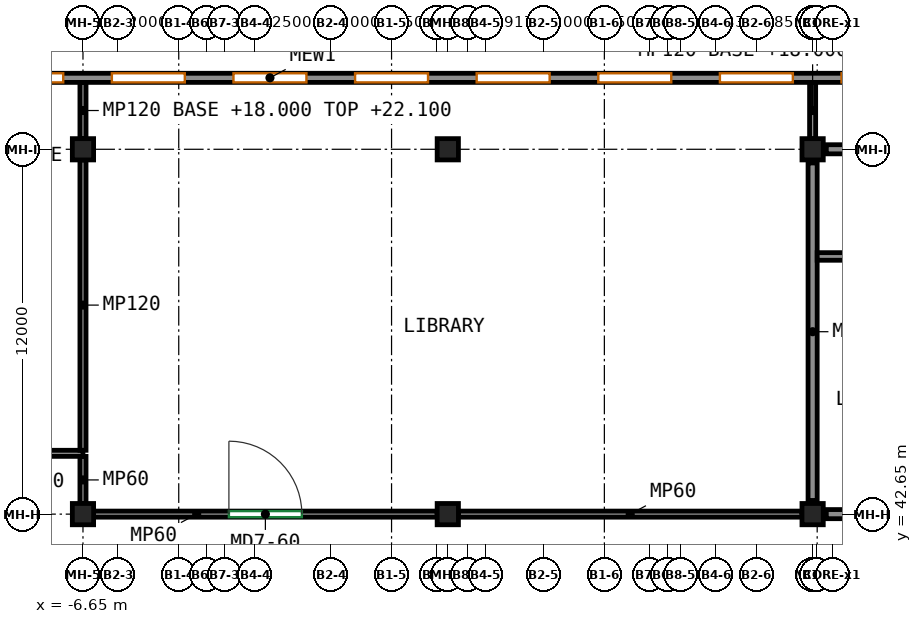
"""IFC4 building model, lengths in metres.
Left out: names, types, materials, properties, quantities, classifications, styles, units other than length and angle.
Written with IfcOpenShell. Run it as: python <this file> out.ifc"""

import sys

from ifc_helpers import new_model, si_unit, direction, frame, frame_2d, origin, origin_2d, place, context, subcontext, project, spatial, rectangle, extrude, source, transform, mapped, element, fill, save


model = new_model("IFC4")
c1 = context("Model", 3, precision=1e-05, world=origin(), true_north=direction((0.0, 1.0)))
c2 = subcontext(c1, "Body", "Model", "MODEL_VIEW")
j1 = project(units=[si_unit("LENGTHUNIT", "METRE"), si_unit("PLANEANGLEUNIT", "RADIAN")], contexts=[c1])
p1 = place(None, origin())
s1 = spatial("IfcSite", under=j1, at=p1, CompositionType="ELEMENT")
p2 = place(p1, origin())
s2 = spatial("IfcBuilding", under=s1, at=p2, CompositionType="ELEMENT")
p3 = place(p2, frame((0.0, 0.0, 18.0)))
s3 = spatial("IfcBuildingStorey", under=s2, at=p3, CompositionType="ELEMENT", Elevation=18.0)
m1 = source(origin(), c2, "Body", "SweptSolid", [
    extrude(rectangle(XDim=0.7, YDim=0.7, at=origin_2d()), origin(), (0.0, 0.0, 1.0), 4.1),
])
for number, where, z_axis, x_axis in (
    (1, (-6.65, 42.65, 0.0), (0.0, 0.0, 1.0), (1.0, 0.0, 0.0)),
    (2, (-6.65, 54.65, 0.0), (0.0, 0.0, 1.0), (1.0, 0.0, 0.0)),
    (3, (5.35, 42.65, 0.0), (0.0, 0.0, 1.0), (1.0, 0.0, 0.0)),
    (4, (5.35, 54.65, 0.0), (0.0, 0.0, 1.0), (1.0, 0.0, 0.0)),
    (5, (17.35, 42.65, 0.0), (0.0, 0.0, 1.0), (1.0, 0.0, 0.0)),
    (6, (17.35, 54.65, 0.0), (0.0, 0.0, 1.0), (1.0, 0.0, 0.0)),
):
    element("IfcColumn", number, at=place(p3, frame(where, z_axis=z_axis, x_axis=x_axis)), inside=s3, PredefinedType="COLUMN", context=c2, shape_type="MappedRepresentation", body=[
        mapped(m1, transform((0.0, 0.0, 0.0))),
    ])
m2 = source(origin(), c2, "Body", "SweptSolid", [
    extrude(rectangle(XDim=12.4, YDim=0.3, at=frame_2d((6.2, 0.0))), origin(), (0.0, 0.0, 1.0), 3.3),
])
p4 = place(p3, frame((30.2, 54.65, 0.0), z_axis=(0.0, 0.0, 1.0), x_axis=(-1.0, 0.0, 0.0)))
e7 = element("IfcWall", 7, at=p4, inside=s3, PredefinedType="SHEAR", context=c2, shape_type="MappedRepresentation", body=[
    mapped(m2, transform((0.0, 0.0, 0.0))),
])
p5 = place(p4, frame((5.7, 0.0, 0.0)))
e8 = element("IfcOpeningElement", 8, at=p5, cuts=e7, PredefinedType="OPENING", context=c2, shape_type="SweptSolid", body=[
    extrude(rectangle(XDim=1.0, YDim=2.1, at=frame_2d((0.5, 1.05))), frame((0.0, 0.16, 0.0), z_axis=(0.0, -1.0, 0.0), x_axis=(1.0, 0.0, 0.0)), (0.0, 0.0, 1.0), 0.32),
])
p6 = place(p3, frame((30.2, 42.65, 0.0), z_axis=(0.0, 0.0, 1.0), x_axis=(-1.0, 0.0, 0.0)))
e9 = element("IfcWall", 9, at=p6, inside=s3, PredefinedType="SHEAR", context=c2, shape_type="MappedRepresentation", body=[
    mapped(m2, transform((0.0, 0.0, 0.0))),
])
p7 = place(p6, frame((5.2, 0.0, 0.0)))
e10 = element("IfcOpeningElement", 10, at=p7, cuts=e9, PredefinedType="OPENING", context=c2, shape_type="SweptSolid", body=[
    extrude(rectangle(XDim=2.0, YDim=2.4, at=frame_2d((1.0, 1.2))), frame((0.0, 0.16, 0.0), z_axis=(0.0, -1.0, 0.0), x_axis=(1.0, 0.0, 0.0)), (0.0, 0.0, 1.0), 0.32),
])
m3 = source(origin(), c2, "Body", "SweptSolid", [
    extrude(rectangle(XDim=11.1, YDim=0.3, at=frame_2d((5.55, 0.0))), origin(), (0.0, 0.0, 1.0), 3.3),
])
p8 = place(p3, frame((17.35, 54.2, 0.0), z_axis=(0.0, 0.0, 1.0), x_axis=(0.0, -1.0, 0.0)))
e11 = element("IfcWall", 11, at=p8, inside=s3, PredefinedType="SHEAR", context=c2, shape_type="MappedRepresentation", body=[
    mapped(m3, transform((0.0, 0.0, 0.0))),
])
m4 = source(origin(), c2, "Body", "SweptSolid", [
    extrude(rectangle(XDim=4.15, YDim=0.25, at=frame_2d((2.075, 0.0))), origin(), (0.0, 0.0, 1.0), 4.1),
])
p9 = place(p3, frame((21.65, 51.125, 0.0), z_axis=(0.0, 0.0, 1.0), x_axis=(-1.0, 0.0, 0.0)))
e12 = element("IfcWall", 12, at=p9, inside=s3, PredefinedType="SHEAR", context=c2, shape_type="MappedRepresentation", body=[
    mapped(m4, transform((0.0, 0.0, 0.0))),
])
p10 = place(p9, frame((1.4, 0.0, 0.0)))
e13 = element("IfcOpeningElement", 13, at=p10, cuts=e12, PredefinedType="OPENING", context=c2, shape_type="SweptSolid", body=[
    extrude(rectangle(XDim=1.1, YDim=2.1, at=frame_2d((0.55, 1.05))), frame((0.0, 0.135, 0.0), z_axis=(0.0, -1.0, 0.0), x_axis=(1.0, 0.0, 0.0)), (0.0, 0.0, 1.0), 0.27),
])
m5 = source(origin(), c2, "Body", "SweptSolid", [
    extrude(rectangle(XDim=112.7, YDim=0.3, at=frame_2d((56.35, 0.0))), origin(), (0.0, 0.0, 1.0), 4.1),
])
p11 = place(p3, frame((-56.85, 57.0, 0.0), z_axis=(0.0, 0.0, 1.0), x_axis=(1.0, 0.0, 0.0)))
e14 = element("IfcWall", 14, at=p11, inside=s3, PredefinedType="SOLIDWALL", context=c2, shape_type="MappedRepresentation", body=[
    mapped(m5, transform((0.0, 0.0, 0.0))),
])
p12 = place(p11, frame((3.15, 0.0, 0.9)))
e15 = element("IfcOpeningElement", 15, at=p12, cuts=e14, PredefinedType="OPENING", context=c2, shape_type="SweptSolid", body=[
    extrude(rectangle(XDim=2.4, YDim=1.8, at=frame_2d((1.2, 0.9))), frame((0.0, 0.16, 0.0), z_axis=(0.0, -1.0, 0.0), x_axis=(1.0, 0.0, 0.0)), (0.0, 0.0, 1.0), 0.32),
])
p13 = place(p11, frame((7.15, 0.0, 0.9)))
e16 = element("IfcOpeningElement", 16, at=p13, cuts=e14, PredefinedType="OPENING", context=c2, shape_type="SweptSolid", body=[
    extrude(rectangle(XDim=2.4, YDim=1.8, at=frame_2d((1.2, 0.9))), frame((0.0, 0.16, 0.0), z_axis=(0.0, -1.0, 0.0), x_axis=(1.0, 0.0, 0.0)), (0.0, 0.0, 1.0), 0.32),
])
p14 = place(p11, frame((11.15, 0.0, 0.9)))
e17 = element("IfcOpeningElement", 17, at=p14, cuts=e14, PredefinedType="OPENING", context=c2, shape_type="SweptSolid", body=[
    extrude(rectangle(XDim=2.4, YDim=1.8, at=frame_2d((1.2, 0.9))), frame((0.0, 0.16, 0.0), z_axis=(0.0, -1.0, 0.0), x_axis=(1.0, 0.0, 0.0)), (0.0, 0.0, 1.0), 0.32),
])
p15 = place(p11, frame((15.15, 0.0, 0.9)))
e18 = element("IfcOpeningElement", 18, at=p15, cuts=e14, PredefinedType="OPENING", context=c2, shape_type="SweptSolid", body=[
    extrude(rectangle(XDim=2.4, YDim=1.8, at=frame_2d((1.2, 0.9))), frame((0.0, 0.16, 0.0), z_axis=(0.0, -1.0, 0.0), x_axis=(1.0, 0.0, 0.0)), (0.0, 0.0, 1.0), 0.32),
])
p16 = place(p11, frame((19.15, 0.0, 0.9)))
e19 = element("IfcOpeningElement", 19, at=p16, cuts=e14, PredefinedType="OPENING", context=c2, shape_type="SweptSolid", body=[
    extrude(rectangle(XDim=2.4, YDim=1.8, at=frame_2d((1.2, 0.9))), frame((0.0, 0.16, 0.0), z_axis=(0.0, -1.0, 0.0), x_axis=(1.0, 0.0, 0.0)), (0.0, 0.0, 1.0), 0.32),
])
p17 = place(p11, frame((23.15, 0.0, 0.9)))
e20 = element("IfcOpeningElement", 20, at=p17, cuts=e14, PredefinedType="OPENING", context=c2, shape_type="SweptSolid", body=[
    extrude(rectangle(XDim=2.4, YDim=1.8, at=frame_2d((1.2, 0.9))), frame((0.0, 0.16, 0.0), z_axis=(0.0, -1.0, 0.0), x_axis=(1.0, 0.0, 0.0)), (0.0, 0.0, 1.0), 0.32),
])
p18 = place(p11, frame((27.15, 0.0, 0.9)))
e21 = element("IfcOpeningElement", 21, at=p18, cuts=e14, PredefinedType="OPENING", context=c2, shape_type="SweptSolid", body=[
    extrude(rectangle(XDim=2.4, YDim=1.8, at=frame_2d((1.2, 0.9))), frame((0.0, 0.16, 0.0), z_axis=(0.0, -1.0, 0.0), x_axis=(1.0, 0.0, 0.0)), (0.0, 0.0, 1.0), 0.32),
])
p19 = place(p11, frame((31.15, 0.0, 0.9)))
e22 = element("IfcOpeningElement", 22, at=p19, cuts=e14, PredefinedType="OPENING", context=c2, shape_type="SweptSolid", body=[
    extrude(rectangle(XDim=2.4, YDim=1.8, at=frame_2d((1.2, 0.9))), frame((0.0, 0.16, 0.0), z_axis=(0.0, -1.0, 0.0), x_axis=(1.0, 0.0, 0.0)), (0.0, 0.0, 1.0), 0.32),
])
p20 = place(p11, frame((35.15, 0.0, 0.9)))
e23 = element("IfcOpeningElement", 23, at=p20, cuts=e14, PredefinedType="OPENING", context=c2, shape_type="SweptSolid", body=[
    extrude(rectangle(XDim=2.4, YDim=1.8, at=frame_2d((1.2, 0.9))), frame((0.0, 0.16, 0.0), z_axis=(0.0, -1.0, 0.0), x_axis=(1.0, 0.0, 0.0)), (0.0, 0.0, 1.0), 0.32),
])
p21 = place(p11, frame((43.15, 0.0, 0.9)))
e24 = element("IfcOpeningElement", 24, at=p21, cuts=e14, PredefinedType="OPENING", context=c2, shape_type="SweptSolid", body=[
    extrude(rectangle(XDim=2.4, YDim=1.8, at=frame_2d((1.2, 0.9))), frame((0.0, 0.16, 0.0), z_axis=(0.0, -1.0, 0.0), x_axis=(1.0, 0.0, 0.0)), (0.0, 0.0, 1.0), 0.32),
])
p22 = place(p11, frame((47.15, 0.0, 0.9)))
e25 = element("IfcOpeningElement", 25, at=p22, cuts=e14, PredefinedType="OPENING", context=c2, shape_type="SweptSolid", body=[
    extrude(rectangle(XDim=2.4, YDim=1.8, at=frame_2d((1.2, 0.9))), frame((0.0, 0.16, 0.0), z_axis=(0.0, -1.0, 0.0), x_axis=(1.0, 0.0, 0.0)), (0.0, 0.0, 1.0), 0.32),
])
p23 = place(p11, frame((51.15, 0.0, 0.9)))
e26 = element("IfcOpeningElement", 26, at=p23, cuts=e14, PredefinedType="OPENING", context=c2, shape_type="SweptSolid", body=[
    extrude(rectangle(XDim=2.4, YDim=1.8, at=frame_2d((1.2, 0.9))), frame((0.0, 0.16, 0.0), z_axis=(0.0, -1.0, 0.0), x_axis=(1.0, 0.0, 0.0)), (0.0, 0.0, 1.0), 0.32),
])
p24 = place(p11, frame((55.15, 0.0, 0.9)))
e27 = element("IfcOpeningElement", 27, at=p24, cuts=e14, PredefinedType="OPENING", context=c2, shape_type="SweptSolid", body=[
    extrude(rectangle(XDim=2.4, YDim=1.8, at=frame_2d((1.2, 0.9))), frame((0.0, 0.16, 0.0), z_axis=(0.0, -1.0, 0.0), x_axis=(1.0, 0.0, 0.0)), (0.0, 0.0, 1.0), 0.32),
])
p25 = place(p11, frame((59.15, 0.0, 0.9)))
e28 = element("IfcOpeningElement", 28, at=p25, cuts=e14, PredefinedType="OPENING", context=c2, shape_type="SweptSolid", body=[
    extrude(rectangle(XDim=2.4, YDim=1.8, at=frame_2d((1.2, 0.9))), frame((0.0, 0.16, 0.0), z_axis=(0.0, -1.0, 0.0), x_axis=(1.0, 0.0, 0.0)), (0.0, 0.0, 1.0), 0.32),
])
p26 = place(p11, frame((63.15, 0.0, 0.9)))
e29 = element("IfcOpeningElement", 29, at=p26, cuts=e14, PredefinedType="OPENING", context=c2, shape_type="SweptSolid", body=[
    extrude(rectangle(XDim=2.4, YDim=1.8, at=frame_2d((1.2, 0.9))), frame((0.0, 0.16, 0.0), z_axis=(0.0, -1.0, 0.0), x_axis=(1.0, 0.0, 0.0)), (0.0, 0.0, 1.0), 0.32),
])
p27 = place(p11, frame((67.15, 0.0, 0.9)))
e30 = element("IfcOpeningElement", 30, at=p27, cuts=e14, PredefinedType="OPENING", context=c2, shape_type="SweptSolid", body=[
    extrude(rectangle(XDim=2.4, YDim=1.8, at=frame_2d((1.2, 0.9))), frame((0.0, 0.16, 0.0), z_axis=(0.0, -1.0, 0.0), x_axis=(1.0, 0.0, 0.0)), (0.0, 0.0, 1.0), 0.32),
])
p28 = place(p11, frame((71.15, 0.0, 0.9)))
e31 = element("IfcOpeningElement", 31, at=p28, cuts=e14, PredefinedType="OPENING", context=c2, shape_type="SweptSolid", body=[
    extrude(rectangle(XDim=2.4, YDim=1.8, at=frame_2d((1.2, 0.9))), frame((0.0, 0.16, 0.0), z_axis=(0.0, -1.0, 0.0), x_axis=(1.0, 0.0, 0.0)), (0.0, 0.0, 1.0), 0.32),
])
p29 = place(p11, frame((75.15, 0.0, 0.9)))
e32 = element("IfcOpeningElement", 32, at=p29, cuts=e14, PredefinedType="OPENING", context=c2, shape_type="SweptSolid", body=[
    extrude(rectangle(XDim=2.4, YDim=1.8, at=frame_2d((1.2, 0.9))), frame((0.0, 0.16, 0.0), z_axis=(0.0, -1.0, 0.0), x_axis=(1.0, 0.0, 0.0)), (0.0, 0.0, 1.0), 0.32),
])
p30 = place(p11, frame((79.15, 0.0, 0.9)))
e33 = element("IfcOpeningElement", 33, at=p30, cuts=e14, PredefinedType="OPENING", context=c2, shape_type="SweptSolid", body=[
    extrude(rectangle(XDim=2.4, YDim=1.8, at=frame_2d((1.2, 0.9))), frame((0.0, 0.16, 0.0), z_axis=(0.0, -1.0, 0.0), x_axis=(1.0, 0.0, 0.0)), (0.0, 0.0, 1.0), 0.32),
])
p31 = place(p11, frame((83.15, 0.0, 0.9)))
e34 = element("IfcOpeningElement", 34, at=p31, cuts=e14, PredefinedType="OPENING", context=c2, shape_type="SweptSolid", body=[
    extrude(rectangle(XDim=2.4, YDim=1.8, at=frame_2d((1.2, 0.9))), frame((0.0, 0.16, 0.0), z_axis=(0.0, -1.0, 0.0), x_axis=(1.0, 0.0, 0.0)), (0.0, 0.0, 1.0), 0.32),
])
p32 = place(p11, frame((87.15, 0.0, 0.9)))
e35 = element("IfcOpeningElement", 35, at=p32, cuts=e14, PredefinedType="OPENING", context=c2, shape_type="SweptSolid", body=[
    extrude(rectangle(XDim=2.4, YDim=1.8, at=frame_2d((1.2, 0.9))), frame((0.0, 0.16, 0.0), z_axis=(0.0, -1.0, 0.0), x_axis=(1.0, 0.0, 0.0)), (0.0, 0.0, 1.0), 0.32),
])
p33 = place(p11, frame((91.15, 0.0, 0.9)))
e36 = element("IfcOpeningElement", 36, at=p33, cuts=e14, PredefinedType="OPENING", context=c2, shape_type="SweptSolid", body=[
    extrude(rectangle(XDim=2.4, YDim=1.8, at=frame_2d((1.2, 0.9))), frame((0.0, 0.16, 0.0), z_axis=(0.0, -1.0, 0.0), x_axis=(1.0, 0.0, 0.0)), (0.0, 0.0, 1.0), 0.32),
])
p34 = place(p11, frame((95.15, 0.0, 0.9)))
e37 = element("IfcOpeningElement", 37, at=p34, cuts=e14, PredefinedType="OPENING", context=c2, shape_type="SweptSolid", body=[
    extrude(rectangle(XDim=2.4, YDim=1.8, at=frame_2d((1.2, 0.9))), frame((0.0, 0.16, 0.0), z_axis=(0.0, -1.0, 0.0), x_axis=(1.0, 0.0, 0.0)), (0.0, 0.0, 1.0), 0.32),
])
p35 = place(p11, frame((103.15, 0.0, 0.9)))
e38 = element("IfcOpeningElement", 38, at=p35, cuts=e14, PredefinedType="OPENING", context=c2, shape_type="SweptSolid", body=[
    extrude(rectangle(XDim=2.4, YDim=1.8, at=frame_2d((1.2, 0.9))), frame((0.0, 0.16, 0.0), z_axis=(0.0, -1.0, 0.0), x_axis=(1.0, 0.0, 0.0)), (0.0, 0.0, 1.0), 0.32),
])
p36 = place(p11, frame((107.15, 0.0, 0.9)))
e39 = element("IfcOpeningElement", 39, at=p36, cuts=e14, PredefinedType="OPENING", context=c2, shape_type="SweptSolid", body=[
    extrude(rectangle(XDim=2.4, YDim=1.8, at=frame_2d((1.2, 0.9))), frame((0.0, 0.16, 0.0), z_axis=(0.0, -1.0, 0.0), x_axis=(1.0, 0.0, 0.0)), (0.0, 0.0, 1.0), 0.32),
])
m6 = source(origin(), c2, "Body", "SweptSolid", [
    extrude(rectangle(XDim=3.9, YDim=0.2, at=frame_2d((1.95, 0.0))), origin(), (0.0, 0.0, 1.0), 3.3),
])
p37 = place(p3, frame((-10.55, 44.65, 0.0), z_axis=(0.0, 0.0, 1.0), x_axis=(1.0, 0.0, 0.0)))
e40 = element("IfcWall", 40, at=p37, inside=s3, PredefinedType="PARTITIONING", context=c2, shape_type="MappedRepresentation", body=[
    mapped(m6, transform((0.0, 0.0, 0.0))),
])
p38 = place(p37, frame((1.35, 0.0, 0.0)))
e41 = element("IfcOpeningElement", 41, at=p38, cuts=e40, PredefinedType="OPENING", context=c2, shape_type="SweptSolid", body=[
    extrude(rectangle(XDim=1.2, YDim=2.1, at=frame_2d((0.6, 1.05))), frame((0.0, 0.11, 0.0), z_axis=(0.0, -1.0, 0.0), x_axis=(1.0, 0.0, 0.0)), (0.0, 0.0, 1.0), 0.22),
])
m7 = source(origin(), c2, "Body", "SweptSolid", [
    extrude(rectangle(XDim=1.55, YDim=0.2, at=frame_2d((0.775, 0.0))), origin(), (0.0, 0.0, 1.0), 3.3),
])
p39 = place(p3, frame((-6.65, 44.55, 0.0), z_axis=(0.0, 0.0, 1.0), x_axis=(0.0, -1.0, 0.0)))
e42 = element("IfcWall", 42, at=p39, inside=s3, PredefinedType="PARTITIONING", context=c2, shape_type="MappedRepresentation", body=[
    mapped(m7, transform((0.0, 0.0, 0.0))),
])
m8 = source(origin(), c2, "Body", "SweptSolid", [
    extrude(rectangle(XDim=9.55, YDim=0.2, at=frame_2d((4.775, 0.0))), origin(), (0.0, 0.0, 1.0), 3.3),
])
p40 = place(p3, frame((-6.65, 54.3, 0.0), z_axis=(0.0, 0.0, 1.0), x_axis=(0.0, -1.0, 0.0)))
e43 = element("IfcWall", 43, at=p40, inside=s3, PredefinedType="PARTITIONING", context=c2, shape_type="MappedRepresentation", body=[
    mapped(m8, transform((0.0, 0.0, 0.0))),
])
m9 = source(origin(), c2, "Body", "SweptSolid", [
    extrude(rectangle(XDim=1.85, YDim=0.2, at=frame_2d((0.925, 0.0))), origin(), (0.0, 0.0, 1.0), 4.1),
])
p41 = place(p3, frame((-6.65, 56.85, 0.0), z_axis=(0.0, 0.0, 1.0), x_axis=(0.0, -1.0, 0.0)))
e44 = element("IfcWall", 44, at=p41, inside=s3, PredefinedType="PARTITIONING", context=c2, shape_type="MappedRepresentation", body=[
    mapped(m9, transform((0.0, 0.0, 0.0))),
])
m10 = source(origin(), c2, "Body", "SweptSolid", [
    extrude(rectangle(XDim=11.3, YDim=0.2, at=frame_2d((5.65, 0.0))), origin(), (0.0, 0.0, 1.0), 3.3),
])
p42 = place(p3, frame((-6.3, 42.65, 0.0), z_axis=(0.0, 0.0, 1.0), x_axis=(1.0, 0.0, 0.0)))
e45 = element("IfcWall", 45, at=p42, inside=s3, PredefinedType="PARTITIONING", context=c2, shape_type="MappedRepresentation", body=[
    mapped(m10, transform((0.0, 0.0, 0.0))),
])
p43 = place(p42, frame((4.45, 0.0, 0.0)))
e46 = element("IfcOpeningElement", 46, at=p43, cuts=e45, PredefinedType="OPENING", context=c2, shape_type="SweptSolid", body=[
    extrude(rectangle(XDim=2.4, YDim=2.4, at=frame_2d((1.2, 1.2))), frame((0.0, 0.11, 0.0), z_axis=(0.0, -1.0, 0.0), x_axis=(1.0, 0.0, 0.0)), (0.0, 0.0, 1.0), 0.22),
])
p44 = place(p3, frame((5.7, 42.65, 0.0), z_axis=(0.0, 0.0, 1.0), x_axis=(1.0, 0.0, 0.0)))
e47 = element("IfcWall", 47, at=p44, inside=s3, PredefinedType="PARTITIONING", context=c2, shape_type="MappedRepresentation", body=[
    mapped(m10, transform((0.0, 0.0, 0.0))),
])
p45 = place(p3, frame((17.35, 56.85, 0.0), z_axis=(0.0, 0.0, 1.0), x_axis=(0.0, -1.0, 0.0)))
e48 = element("IfcWall", 48, at=p45, inside=s3, PredefinedType="PARTITIONING", context=c2, shape_type="MappedRepresentation", body=[
    mapped(m9, transform((0.0, 0.0, 0.0))),
])
p46 = place(p22, origin())
e49 = element("IfcWindow", 49, at=p46, inside=s3, PartitioningType="SINGLE_PANEL", PredefinedType="WINDOW", context=c2, shape_type="SweptSolid", body=[
    extrude(rectangle(XDim=2.4, YDim=1.8, at=frame_2d((1.2, 0.9))), frame((0.0, 0.03, 0.0), z_axis=(0.0, -1.0, 0.0), x_axis=(1.0, 0.0, 0.0)), (0.0, 0.0, 1.0), 0.06),
])
fill(e25, e49)
p47 = place(p23, origin())
e50 = element("IfcWindow", 50, at=p47, inside=s3, PartitioningType="SINGLE_PANEL", PredefinedType="WINDOW", context=c2, shape_type="SweptSolid", body=[
    extrude(rectangle(XDim=2.4, YDim=1.8, at=frame_2d((1.2, 0.9))), frame((0.0, 0.03, 0.0), z_axis=(0.0, -1.0, 0.0), x_axis=(1.0, 0.0, 0.0)), (0.0, 0.0, 1.0), 0.06),
])
fill(e26, e50)
p48 = place(p24, origin())
e51 = element("IfcWindow", 51, at=p48, inside=s3, PartitioningType="SINGLE_PANEL", PredefinedType="WINDOW", context=c2, shape_type="SweptSolid", body=[
    extrude(rectangle(XDim=2.4, YDim=1.8, at=frame_2d((1.2, 0.9))), frame((0.0, 0.03, 0.0), z_axis=(0.0, -1.0, 0.0), x_axis=(1.0, 0.0, 0.0)), (0.0, 0.0, 1.0), 0.06),
])
fill(e27, e51)
p49 = place(p25, origin())
e52 = element("IfcWindow", 52, at=p49, inside=s3, PartitioningType="SINGLE_PANEL", PredefinedType="WINDOW", context=c2, shape_type="SweptSolid", body=[
    extrude(rectangle(XDim=2.4, YDim=1.8, at=frame_2d((1.2, 0.9))), frame((0.0, 0.03, 0.0), z_axis=(0.0, -1.0, 0.0), x_axis=(1.0, 0.0, 0.0)), (0.0, 0.0, 1.0), 0.06),
])
fill(e28, e52)
p50 = place(p26, origin())
e53 = element("IfcWindow", 53, at=p50, inside=s3, PartitioningType="SINGLE_PANEL", PredefinedType="WINDOW", context=c2, shape_type="SweptSolid", body=[
    extrude(rectangle(XDim=2.4, YDim=1.8, at=frame_2d((1.2, 0.9))), frame((0.0, 0.03, 0.0), z_axis=(0.0, -1.0, 0.0), x_axis=(1.0, 0.0, 0.0)), (0.0, 0.0, 1.0), 0.06),
])
fill(e29, e53)
p51 = place(p27, origin())
e54 = element("IfcWindow", 54, at=p51, inside=s3, PartitioningType="SINGLE_PANEL", PredefinedType="WINDOW", context=c2, shape_type="SweptSolid", body=[
    extrude(rectangle(XDim=2.4, YDim=1.8, at=frame_2d((1.2, 0.9))), frame((0.0, 0.03, 0.0), z_axis=(0.0, -1.0, 0.0), x_axis=(1.0, 0.0, 0.0)), (0.0, 0.0, 1.0), 0.06),
])
fill(e30, e54)
p52 = place(p28, origin())
e55 = element("IfcWindow", 55, at=p52, inside=s3, PartitioningType="SINGLE_PANEL", PredefinedType="WINDOW", context=c2, shape_type="SweptSolid", body=[
    extrude(rectangle(XDim=2.4, YDim=1.8, at=frame_2d((1.2, 0.9))), frame((0.0, 0.03, 0.0), z_axis=(0.0, -1.0, 0.0), x_axis=(1.0, 0.0, 0.0)), (0.0, 0.0, 1.0), 0.06),
])
fill(e31, e55)
p53 = place(p29, origin())
e56 = element("IfcWindow", 56, at=p53, inside=s3, PartitioningType="SINGLE_PANEL", PredefinedType="WINDOW", context=c2, shape_type="SweptSolid", body=[
    extrude(rectangle(XDim=2.4, YDim=1.8, at=frame_2d((1.2, 0.9))), frame((0.0, 0.03, 0.0), z_axis=(0.0, -1.0, 0.0), x_axis=(1.0, 0.0, 0.0)), (0.0, 0.0, 1.0), 0.06),
])
fill(e32, e56)
p54 = place(p43, origin())
e57 = element("IfcDoor", 57, at=p54, inside=s3, OperationType="DOUBLE_DOOR_SINGLE_SWING", PredefinedType="DOOR", context=c2, shape_type="SweptSolid", body=[
    extrude(rectangle(XDim=2.4, YDim=2.4, at=frame_2d((1.2, 1.2))), frame((0.0, 0.025, 0.0), z_axis=(0.0, -1.0, 0.0), x_axis=(1.0, 0.0, 0.0)), (0.0, 0.0, 1.0), 0.05),
])
fill(e46, e57)
save(model, sys.argv[1])
